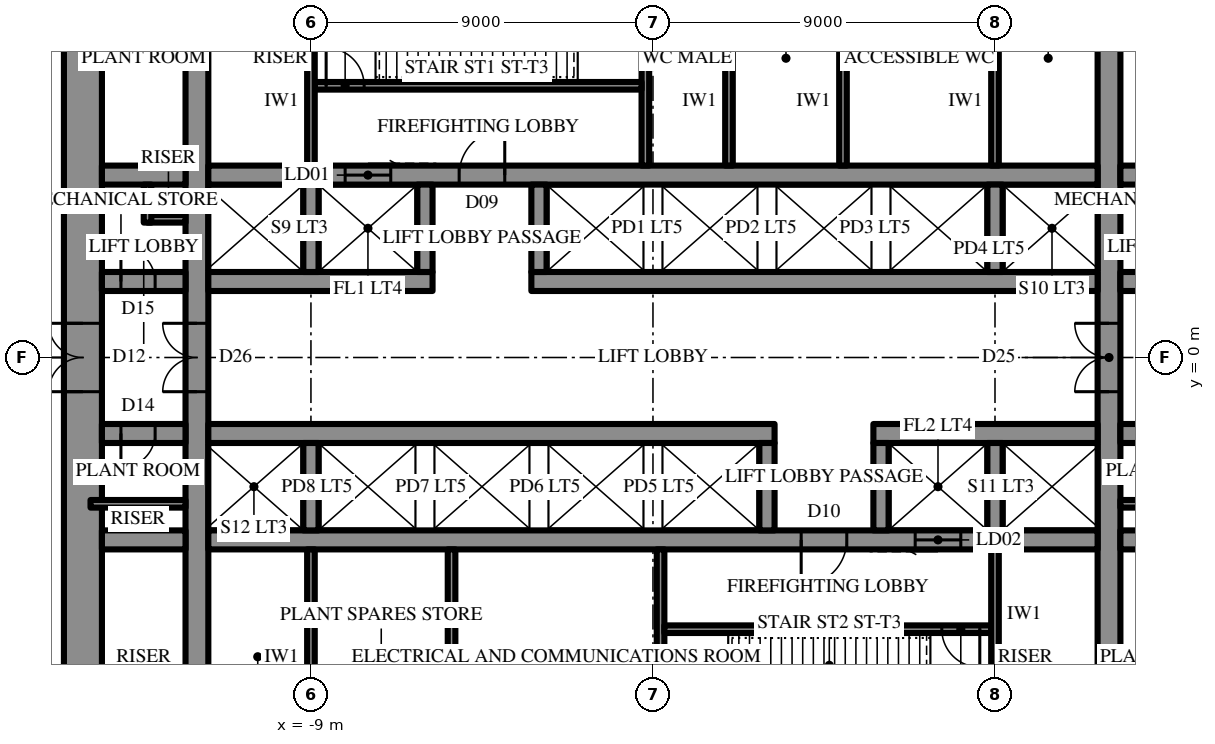
"""IFC4 building model, lengths in metres.
Left out: names, types, materials, properties, quantities, classifications, styles, units other than length and angle.
Written with IfcOpenShell. Run it as: python <this file> out.ifc"""

import sys

from ifc_helpers import new_model, si_unit, direction, frame, frame_2d, origin, place, context, subcontext, project, spatial, rectangle, extrude, element, fill, save


model = new_model("IFC4")
c1 = context("Model", 3, precision=1e-05, world=origin(), true_north=direction((0.0, 1.0)))
c2 = subcontext(c1, "Body", "Model", "MODEL_VIEW")
j1 = project(units=[si_unit("LENGTHUNIT", "METRE"), si_unit("PLANEANGLEUNIT", "RADIAN")], contexts=[c1])
p1 = place(None, origin())
s1 = spatial("IfcSite", under=j1, at=p1, CompositionType="ELEMENT")
p2 = place(p1, origin())
s2 = spatial("IfcBuilding", under=s1, at=p2, CompositionType="ELEMENT")
p3 = place(p2, frame((0.0, 0.0, 299.5)))
s3 = spatial("IfcBuildingStorey", under=s2, at=p3, CompositionType="ELEMENT", Elevation=299.5)
p4 = place(p3, frame((-15.0, 10.7, 0.0), z_axis=(0.0, 0.0, 1.0), x_axis=(0.0, -1.0, 0.0)))
e1 = element("IfcWall", 1, at=p4, inside=s3, PredefinedType="SHEAR", context=c2, shape_type="SweptSolid", body=[
    extrude(rectangle(XDim=21.4, YDim=1.0, at=frame_2d((10.7, 0.0))), origin(), (0.0, 0.0, 1.0), 7.0),
])
p5 = place(p4, frame((9.8, 0.0, 0.0)))
e2 = element("IfcOpeningElement", 2, at=p5, cuts=e1, PredefinedType="OPENING", context=c2, shape_type="SweptSolid", body=[
    extrude(rectangle(XDim=1.8, YDim=2.4, at=frame_2d((0.9, 1.2))), frame((0.0, 0.51, 0.0), z_axis=(0.0, -1.0, 0.0), x_axis=(1.0, 0.0, 0.0)), (0.0, 0.0, 1.0), 1.02),
])
p6 = place(p3, frame((12.0, -10.7, 0.0), z_axis=(0.0, 0.0, 1.0), x_axis=(0.0, 1.0, 0.0)))
e3 = element("IfcWall", 3, at=p6, inside=s3, PredefinedType="SHEAR", context=c2, shape_type="SweptSolid", body=[
    extrude(rectangle(XDim=21.4, YDim=0.6, at=frame_2d((10.7, 0.0))), origin(), (0.0, 0.0, 1.0), 7.0),
])
p7 = place(p6, frame((9.8, 0.0, 0.0)))
e4 = element("IfcOpeningElement", 4, at=p7, cuts=e3, PredefinedType="OPENING", context=c2, shape_type="SweptSolid", body=[
    extrude(rectangle(XDim=1.8, YDim=2.4, at=frame_2d((0.9, 1.2))), frame((0.0, 0.31, 0.0), z_axis=(0.0, -1.0, 0.0), x_axis=(1.0, 0.0, 0.0)), (0.0, 0.0, 1.0), 0.62),
])
p8 = place(p3, frame((-12.0, -10.7, 0.0), z_axis=(0.0, 0.0, 1.0), x_axis=(0.0, 1.0, 0.0)))
e5 = element("IfcWall", 5, at=p8, inside=s3, PredefinedType="SHEAR", context=c2, shape_type="SweptSolid", body=[
    extrude(rectangle(XDim=21.4, YDim=0.6, at=frame_2d((10.7, 0.0))), origin(), (0.0, 0.0, 1.0), 7.0),
])
p9 = place(p8, frame((9.8, 0.0, 0.0)))
e6 = element("IfcOpeningElement", 6, at=p9, cuts=e5, PredefinedType="OPENING", context=c2, shape_type="SweptSolid", body=[
    extrude(rectangle(XDim=1.8, YDim=2.4, at=frame_2d((0.9, 1.2))), frame((0.0, 0.31, 0.0), z_axis=(0.0, -1.0, 0.0), x_axis=(1.0, 0.0, 0.0)), (0.0, 0.0, 1.0), 0.62),
])
p10 = place(p3, frame((-14.5, 2.0, 0.0), z_axis=(0.0, 0.0, 1.0), x_axis=(1.0, 0.0, 0.0)))
e7 = element("IfcWall", 7, at=p10, inside=s3, PredefinedType="SHEAR", context=c2, shape_type="SweptSolid", body=[
    extrude(rectangle(XDim=2.2, YDim=0.5, at=frame_2d((1.1, 0.0))), origin(), (0.0, 0.0, 1.0), 7.0),
])
p11 = place(p10, frame((0.5, 0.0, 0.0)))
e8 = element("IfcOpeningElement", 8, at=p11, cuts=e7, PredefinedType="OPENING", context=c2, shape_type="SweptSolid", body=[
    extrude(rectangle(XDim=0.9, YDim=2.2, at=frame_2d((0.45, 1.1))), frame((0.0, 0.26, 0.0), z_axis=(0.0, -1.0, 0.0), x_axis=(1.0, 0.0, 0.0)), (0.0, 0.0, 1.0), 0.52),
])
p12 = place(p3, frame((-11.7, 2.0, 0.0), z_axis=(0.0, 0.0, 1.0), x_axis=(1.0, 0.0, 0.0)))
e9 = element("IfcWall", 9, at=p12, inside=s3, PredefinedType="SHEAR", context=c2, shape_type="SweptSolid", body=[
    extrude(rectangle(XDim=5.9, YDim=0.5, at=frame_2d((2.95, 0.0))), origin(), (0.0, 0.0, 1.0), 7.0),
])
p13 = place(p3, frame((-3.2, 2.0, 0.0), z_axis=(0.0, 0.0, 1.0), x_axis=(1.0, 0.0, 0.0)))
e10 = element("IfcWall", 10, at=p13, inside=s3, PredefinedType="SHEAR", context=c2, shape_type="SweptSolid", body=[
    extrude(rectangle(XDim=14.9, YDim=0.5, at=frame_2d((7.45, 0.0))), origin(), (0.0, 0.0, 1.0), 7.0),
])
p14 = place(p3, frame((12.3, 2.0, 0.0), z_axis=(0.0, 0.0, 1.0), x_axis=(1.0, 0.0, 0.0)))
e11 = element("IfcWall", 11, at=p14, inside=s3, PredefinedType="SHEAR", context=c2, shape_type="SweptSolid", body=[
    extrude(rectangle(XDim=2.2, YDim=0.5, at=frame_2d((1.1, 0.0))), origin(), (0.0, 0.0, 1.0), 7.0),
])
p15 = place(p14, frame((0.8, 0.0, 0.0)))
e12 = element("IfcOpeningElement", 12, at=p15, cuts=e11, PredefinedType="OPENING", context=c2, shape_type="SweptSolid", body=[
    extrude(rectangle(XDim=0.9, YDim=2.2, at=frame_2d((0.45, 1.1))), frame((0.0, 0.26, 0.0), z_axis=(0.0, -1.0, 0.0), x_axis=(1.0, 0.0, 0.0)), (0.0, 0.0, 1.0), 0.52),
])
p16 = place(p3, frame((-14.5, 4.8, 0.0), z_axis=(0.0, 0.0, 1.0), x_axis=(1.0, 0.0, 0.0)))
e13 = element("IfcWall", 13, at=p16, inside=s3, PredefinedType="SHEAR", context=c2, shape_type="SweptSolid", body=[
    extrude(rectangle(XDim=2.2, YDim=0.5, at=frame_2d((1.1, 0.0))), origin(), (0.0, 0.0, 1.0), 7.0),
])
p17 = place(p3, frame((-11.7, 4.8, 0.0), z_axis=(0.0, 0.0, 1.0), x_axis=(1.0, 0.0, 0.0)))
e14 = element("IfcWall", 14, at=p17, inside=s3, PredefinedType="SHEAR", context=c2, shape_type="SweptSolid", body=[
    extrude(rectangle(XDim=23.4, YDim=0.5, at=frame_2d((11.7, 0.0))), origin(), (0.0, 0.0, 1.0), 7.0),
])
p18 = place(p17, frame((6.6, 0.0, 0.0)))
e15 = element("IfcOpeningElement", 15, at=p18, cuts=e14, PredefinedType="OPENING", context=c2, shape_type="SweptSolid", body=[
    extrude(rectangle(XDim=1.2, YDim=2.2, at=frame_2d((0.6, 1.1))), frame((0.0, 0.26, 0.0), z_axis=(0.0, -1.0, 0.0), x_axis=(1.0, 0.0, 0.0)), (0.0, 0.0, 1.0), 0.52),
])
p19 = place(p17, frame((3.6, 0.0, 0.0)))
e16 = element("IfcOpeningElement", 16, at=p19, cuts=e14, PredefinedType="OPENING", context=c2, shape_type="SweptSolid", body=[
    extrude(rectangle(XDim=1.2, YDim=2.2, at=frame_2d((0.6, 1.1))), frame((0.0, 0.26, 0.0), z_axis=(0.0, -1.0, 0.0), x_axis=(1.0, 0.0, 0.0)), (0.0, 0.0, 1.0), 0.52),
])
p20 = place(p3, frame((12.3, 4.8, 0.0), z_axis=(0.0, 0.0, 1.0), x_axis=(1.0, 0.0, 0.0)))
e17 = element("IfcWall", 17, at=p20, inside=s3, PredefinedType="SHEAR", context=c2, shape_type="SweptSolid", body=[
    extrude(rectangle(XDim=2.2, YDim=0.5, at=frame_2d((1.1, 0.0))), origin(), (0.0, 0.0, 1.0), 7.0),
])
for number, where, z_axis, x_axis in (
    (18, (-9.0, 2.25, 0.0), (0.0, 0.0, 1.0), (0.0, 1.0, 0.0)),
    (19, (-6.0, 2.25, 0.0), (0.0, 0.0, 1.0), (0.0, 1.0, 0.0)),
    (20, (-3.0, 2.25, 0.0), (0.0, 0.0, 1.0), (0.0, 1.0, 0.0)),
    (21, (9.0, 2.25, 0.0), (0.0, 0.0, 1.0), (0.0, 1.0, 0.0)),
):
    element("IfcWall", number, at=place(p3, frame(where, z_axis=z_axis, x_axis=x_axis)), inside=s3, PredefinedType="SHEAR", context=c2, shape_type="SweptSolid", body=[
        extrude(rectangle(XDim=2.3, YDim=0.4, at=frame_2d((1.15, 0.0))), origin(), (0.0, 0.0, 1.0), 7.0),
    ])
p21 = place(p3, frame((-0.2, 5.05, 0.0), z_axis=(0.0, 0.0, 1.0), x_axis=(0.0, 1.0, 0.0)))
e22 = element("IfcWall", 22, at=p21, inside=s3, PredefinedType="SHEAR", context=c2, shape_type="SweptSolid", body=[
    extrude(rectangle(XDim=5.65, YDim=0.2, at=frame_2d((2.825, 0.0))), origin(), (0.0, 0.0, 1.0), 7.0),
])
p22 = place(p3, frame((-8.9, 7.15, 0.0), z_axis=(0.0, 0.0, 1.0), x_axis=(1.0, 0.0, 0.0)))
e23 = element("IfcWall", 23, at=p22, inside=s3, PredefinedType="SHEAR", context=c2, shape_type="SweptSolid", body=[
    extrude(rectangle(XDim=8.6, YDim=0.2, at=frame_2d((4.3, 0.0))), origin(), (0.0, 0.0, 1.0), 7.0),
])
p23 = place(p22, frame((0.3, 0.0, 0.0)))
e24 = element("IfcOpeningElement", 24, at=p23, cuts=e23, PredefinedType="OPENING", context=c2, shape_type="SweptSolid", body=[
    extrude(rectangle(XDim=1.0, YDim=2.2, at=frame_2d((0.5, 1.1))), frame((0.0, 0.11, 0.0), z_axis=(0.0, -1.0, 0.0), x_axis=(1.0, 0.0, 0.0)), (0.0, 0.0, 1.0), 0.22),
])
p24 = place(p3, frame((14.5, -2.0, 0.0), z_axis=(0.0, 0.0, 1.0), x_axis=(-1.0, 0.0, 0.0)))
e25 = element("IfcWall", 25, at=p24, inside=s3, PredefinedType="SHEAR", context=c2, shape_type="SweptSolid", body=[
    extrude(rectangle(XDim=2.2, YDim=0.5, at=frame_2d((1.1, 0.0))), origin(), (0.0, 0.0, 1.0), 7.0),
])
p25 = place(p24, frame((0.5, 0.0, 0.0)))
e26 = element("IfcOpeningElement", 26, at=p25, cuts=e25, PredefinedType="OPENING", context=c2, shape_type="SweptSolid", body=[
    extrude(rectangle(XDim=0.9, YDim=2.2, at=frame_2d((0.45, 1.1))), frame((0.0, 0.26, 0.0), z_axis=(0.0, -1.0, 0.0), x_axis=(1.0, 0.0, 0.0)), (0.0, 0.0, 1.0), 0.52),
])
p26 = place(p3, frame((11.7, -2.0, 0.0), z_axis=(0.0, 0.0, 1.0), x_axis=(-1.0, 0.0, 0.0)))
e27 = element("IfcWall", 27, at=p26, inside=s3, PredefinedType="SHEAR", context=c2, shape_type="SweptSolid", body=[
    extrude(rectangle(XDim=5.9, YDim=0.5, at=frame_2d((2.95, 0.0))), origin(), (0.0, 0.0, 1.0), 7.0),
])
p27 = place(p3, frame((3.2, -2.0, 0.0), z_axis=(0.0, 0.0, 1.0), x_axis=(-1.0, 0.0, 0.0)))
e28 = element("IfcWall", 28, at=p27, inside=s3, PredefinedType="SHEAR", context=c2, shape_type="SweptSolid", body=[
    extrude(rectangle(XDim=14.9, YDim=0.5, at=frame_2d((7.45, 0.0))), origin(), (0.0, 0.0, 1.0), 7.0),
])
p28 = place(p3, frame((-12.3, -2.0, 0.0), z_axis=(0.0, 0.0, 1.0), x_axis=(-1.0, 0.0, 0.0)))
e29 = element("IfcWall", 29, at=p28, inside=s3, PredefinedType="SHEAR", context=c2, shape_type="SweptSolid", body=[
    extrude(rectangle(XDim=2.2, YDim=0.5, at=frame_2d((1.1, 0.0))), origin(), (0.0, 0.0, 1.0), 7.0),
])
p29 = place(p28, frame((0.8, 0.0, 0.0)))
e30 = element("IfcOpeningElement", 30, at=p29, cuts=e29, PredefinedType="OPENING", context=c2, shape_type="SweptSolid", body=[
    extrude(rectangle(XDim=0.9, YDim=2.2, at=frame_2d((0.45, 1.1))), frame((0.0, 0.26, 0.0), z_axis=(0.0, -1.0, 0.0), x_axis=(1.0, 0.0, 0.0)), (0.0, 0.0, 1.0), 0.52),
])
p30 = place(p3, frame((14.5, -4.8, 0.0), z_axis=(0.0, 0.0, 1.0), x_axis=(-1.0, 0.0, 0.0)))
e31 = element("IfcWall", 31, at=p30, inside=s3, PredefinedType="SHEAR", context=c2, shape_type="SweptSolid", body=[
    extrude(rectangle(XDim=2.2, YDim=0.5, at=frame_2d((1.1, 0.0))), origin(), (0.0, 0.0, 1.0), 7.0),
])
p31 = place(p3, frame((11.7, -4.8, 0.0), z_axis=(0.0, 0.0, 1.0), x_axis=(-1.0, 0.0, 0.0)))
e32 = element("IfcWall", 32, at=p31, inside=s3, PredefinedType="SHEAR", context=c2, shape_type="SweptSolid", body=[
    extrude(rectangle(XDim=23.4, YDim=0.5, at=frame_2d((11.7, 0.0))), origin(), (0.0, 0.0, 1.0), 7.0),
])
p32 = place(p31, frame((6.6, 0.0, 0.0)))
e33 = element("IfcOpeningElement", 33, at=p32, cuts=e32, PredefinedType="OPENING", context=c2, shape_type="SweptSolid", body=[
    extrude(rectangle(XDim=1.2, YDim=2.2, at=frame_2d((0.6, 1.1))), frame((0.0, 0.26, 0.0), z_axis=(0.0, -1.0, 0.0), x_axis=(1.0, 0.0, 0.0)), (0.0, 0.0, 1.0), 0.52),
])
p33 = place(p31, frame((3.6, 0.0, 0.0)))
e34 = element("IfcOpeningElement", 34, at=p33, cuts=e32, PredefinedType="OPENING", context=c2, shape_type="SweptSolid", body=[
    extrude(rectangle(XDim=1.2, YDim=2.2, at=frame_2d((0.6, 1.1))), frame((0.0, 0.26, 0.0), z_axis=(0.0, -1.0, 0.0), x_axis=(1.0, 0.0, 0.0)), (0.0, 0.0, 1.0), 0.52),
])
p34 = place(p3, frame((-12.3, -4.8, 0.0), z_axis=(0.0, 0.0, 1.0), x_axis=(-1.0, 0.0, 0.0)))
e35 = element("IfcWall", 35, at=p34, inside=s3, PredefinedType="SHEAR", context=c2, shape_type="SweptSolid", body=[
    extrude(rectangle(XDim=2.2, YDim=0.5, at=frame_2d((1.1, 0.0))), origin(), (0.0, 0.0, 1.0), 7.0),
])
for number, where, z_axis, x_axis in (
    (36, (9.0, -2.25, 0.0), (0.0, 0.0, 1.0), (0.0, -1.0, 0.0)),
    (37, (6.0, -2.25, 0.0), (0.0, 0.0, 1.0), (0.0, -1.0, 0.0)),
    (38, (3.0, -2.25, 0.0), (0.0, 0.0, 1.0), (0.0, -1.0, 0.0)),
    (39, (-9.0, -2.25, 0.0), (0.0, 0.0, 1.0), (0.0, -1.0, 0.0)),
):
    element("IfcWall", number, at=place(p3, frame(where, z_axis=z_axis, x_axis=x_axis)), inside=s3, PredefinedType="SHEAR", context=c2, shape_type="SweptSolid", body=[
        extrude(rectangle(XDim=2.3, YDim=0.4, at=frame_2d((1.15, 0.0))), origin(), (0.0, 0.0, 1.0), 7.0),
    ])
p35 = place(p3, frame((0.2, -5.05, 0.0), z_axis=(0.0, 0.0, 1.0), x_axis=(0.0, -1.0, 0.0)))
e40 = element("IfcWall", 40, at=p35, inside=s3, PredefinedType="SHEAR", context=c2, shape_type="SweptSolid", body=[
    extrude(rectangle(XDim=5.65, YDim=0.2, at=frame_2d((2.825, 0.0))), origin(), (0.0, 0.0, 1.0), 7.0),
])
p36 = place(p3, frame((8.9, -7.15, 0.0), z_axis=(0.0, 0.0, 1.0), x_axis=(-1.0, 0.0, 0.0)))
e41 = element("IfcWall", 41, at=p36, inside=s3, PredefinedType="SHEAR", context=c2, shape_type="SweptSolid", body=[
    extrude(rectangle(XDim=8.6, YDim=0.2, at=frame_2d((4.3, 0.0))), origin(), (0.0, 0.0, 1.0), 7.0),
])
p37 = place(p36, frame((0.3, 0.0, 0.0)))
e42 = element("IfcOpeningElement", 42, at=p37, cuts=e41, PredefinedType="OPENING", context=c2, shape_type="SweptSolid", body=[
    extrude(rectangle(XDim=1.0, YDim=2.2, at=frame_2d((0.5, 1.1))), frame((0.0, 0.11, 0.0), z_axis=(0.0, -1.0, 0.0), x_axis=(1.0, 0.0, 0.0)), (0.0, 0.0, 1.0), 0.22),
])
for number, where, z_axis, x_axis in (
    (43, (-9.0, 5.05, 0.0), (0.0, 0.0, 1.0), (0.0, 1.0, 0.0)),
    (44, (9.0, 5.05, 0.0), (0.0, 0.0, 1.0), (0.0, 1.0, 0.0)),
    (45, (2.0, 5.05, 0.0), (0.0, 0.0, 1.0), (0.0, 1.0, 0.0)),
    (46, (5.0, 5.05, 0.0), (0.0, 0.0, 1.0), (0.0, 1.0, 0.0)),
    (47, (9.0, -5.05, 0.0), (0.0, 0.0, 1.0), (0.0, -1.0, 0.0)),
    (48, (-9.0, -5.05, 0.0), (0.0, 0.0, 1.0), (0.0, -1.0, 0.0)),
    (49, (-5.3, -5.05, 0.0), (0.0, 0.0, 1.0), (0.0, -1.0, 0.0)),
):
    element("IfcWall", number, at=place(p3, frame(where, z_axis=z_axis, x_axis=x_axis)), inside=s3, PredefinedType="PARTITIONING", context=c2, shape_type="SweptSolid", body=[
        extrude(rectangle(XDim=5.65, YDim=0.2, at=frame_2d((2.825, 0.0))), origin(), (0.0, 0.0, 1.0), 6.7),
    ])
for number, where, z_axis, x_axis in (
    (50, (-13.3, 3.65, 0.0), (0.0, 0.0, 1.0), (1.0, 0.0, 0.0)),
    (51, (-13.3, 3.55, 0.0), (0.0, 0.0, 1.0), (0.0, 1.0, 0.0)),
):
    element("IfcWall", number, at=place(p3, frame(where, z_axis=z_axis, x_axis=x_axis)), inside=s3, PredefinedType="PARTITIONING", context=c2, shape_type="SweptSolid", body=[
        extrude(rectangle(XDim=1.0, YDim=0.2, at=frame_2d((0.5, 0.0))), origin(), (0.0, 0.0, 1.0), 6.7),
    ])
for number, where, z_axis, x_axis in (
    (52, (14.8, -3.85, 0.0), (0.0, 0.0, 1.0), (-1.0, 0.0, 0.0)),
    (53, (-12.3, -3.85, 0.0), (0.0, 0.0, 1.0), (-1.0, 0.0, 0.0)),
):
    element("IfcWall", number, at=place(p3, frame(where, z_axis=z_axis, x_axis=x_axis)), inside=s3, PredefinedType="PARTITIONING", context=c2, shape_type="SweptSolid", body=[
        extrude(rectangle(XDim=2.5, YDim=0.2, at=frame_2d((1.25, 0.0))), origin(), (0.0, 0.0, 1.0), 6.7),
    ])
p38 = place(p5, frame((1.8, 0.0, 0.0), z_axis=(0.0, 0.0, 1.0), x_axis=(-1.0, 0.0, 0.0)))
e54 = element("IfcDoor", 54, at=p38, inside=s3, OperationType="DOUBLE_DOOR_SINGLE_SWING", PredefinedType="DOOR", context=c2, shape_type="SweptSolid", body=[
    extrude(rectangle(XDim=1.8, YDim=2.4, at=frame_2d((0.9, 1.2))), frame((0.0, 0.025, 0.0), z_axis=(0.0, -1.0, 0.0), x_axis=(1.0, 0.0, 0.0)), (0.0, 0.0, 1.0), 0.05),
])
fill(e2, e54)
p39 = place(p18, origin())
e55 = element("IfcDoor", 55, at=p39, inside=s3, OperationType="SINGLE_SWING_LEFT", PredefinedType="DOOR", context=c2, shape_type="SweptSolid", body=[
    extrude(rectangle(XDim=1.2, YDim=2.2, at=frame_2d((0.6, 1.1))), frame((0.0, 0.025, 0.0), z_axis=(0.0, -1.0, 0.0), x_axis=(1.0, 0.0, 0.0)), (0.0, 0.0, 1.0), 0.05),
])
fill(e15, e55)
p40 = place(p23, origin())
e56 = element("IfcDoor", 56, at=p40, inside=s3, OperationType="SINGLE_SWING_RIGHT", PredefinedType="DOOR", context=c2, shape_type="SweptSolid", body=[
    extrude(rectangle(XDim=1.0, YDim=2.2, at=frame_2d((0.5, 1.1))), frame((0.0, 0.025, 0.0), z_axis=(0.0, -1.0, 0.0), x_axis=(1.0, 0.0, 0.0)), (0.0, 0.0, 1.0), 0.05),
])
fill(e24, e56)
p41 = place(p32, origin())
e57 = element("IfcDoor", 57, at=p41, inside=s3, OperationType="SINGLE_SWING_LEFT", PredefinedType="DOOR", context=c2, shape_type="SweptSolid", body=[
    extrude(rectangle(XDim=1.2, YDim=2.2, at=frame_2d((0.6, 1.1))), frame((0.0, 0.025, 0.0), z_axis=(0.0, -1.0, 0.0), x_axis=(1.0, 0.0, 0.0)), (0.0, 0.0, 1.0), 0.05),
])
fill(e33, e57)
p42 = place(p37, origin())
e58 = element("IfcDoor", 58, at=p42, inside=s3, OperationType="SINGLE_SWING_RIGHT", PredefinedType="DOOR", context=c2, shape_type="SweptSolid", body=[
    extrude(rectangle(XDim=1.0, YDim=2.2, at=frame_2d((0.5, 1.1))), frame((0.0, 0.025, 0.0), z_axis=(0.0, -1.0, 0.0), x_axis=(1.0, 0.0, 0.0)), (0.0, 0.0, 1.0), 0.05),
])
fill(e42, e58)
p43 = place(p11, origin())
e59 = element("IfcDoor", 59, at=p43, inside=s3, OperationType="SINGLE_SWING_RIGHT", PredefinedType="DOOR", context=c2, shape_type="SweptSolid", body=[
    extrude(rectangle(XDim=0.9, YDim=2.2, at=frame_2d((0.45, 1.1))), frame((0.0, 0.025, 0.0), z_axis=(0.0, -1.0, 0.0), x_axis=(1.0, 0.0, 0.0)), (0.0, 0.0, 1.0), 0.05),
])
fill(e8, e59)
p44 = place(p29, origin())
e60 = element("IfcDoor", 60, at=p44, inside=s3, OperationType="SINGLE_SWING_LEFT", PredefinedType="DOOR", context=c2, shape_type="SweptSolid", body=[
    extrude(rectangle(XDim=0.9, YDim=2.2, at=frame_2d((0.45, 1.1))), frame((0.0, 0.025, 0.0), z_axis=(0.0, -1.0, 0.0), x_axis=(1.0, 0.0, 0.0)), (0.0, 0.0, 1.0), 0.05),
])
fill(e30, e60)
p45 = place(p7, origin())
e61 = element("IfcDoor", 61, at=p45, inside=s3, OperationType="DOUBLE_DOOR_SINGLE_SWING", PredefinedType="DOOR", context=c2, shape_type="SweptSolid", body=[
    extrude(rectangle(XDim=1.8, YDim=2.4, at=frame_2d((0.9, 1.2))), frame((0.0, 0.025, 0.0), z_axis=(0.0, -1.0, 0.0), x_axis=(1.0, 0.0, 0.0)), (0.0, 0.0, 1.0), 0.05),
])
fill(e4, e61)
p46 = place(p9, origin())
e62 = element("IfcDoor", 62, at=p46, inside=s3, OperationType="DOUBLE_DOOR_SINGLE_SWING", PredefinedType="DOOR", context=c2, shape_type="SweptSolid", body=[
    extrude(rectangle(XDim=1.8, YDim=2.4, at=frame_2d((0.9, 1.2))), frame((0.0, 0.025, 0.0), z_axis=(0.0, -1.0, 0.0), x_axis=(1.0, 0.0, 0.0)), (0.0, 0.0, 1.0), 0.05),
])
fill(e6, e62)
p47 = place(p19, origin())
e63 = element("IfcDoor", 63, at=p47, inside=s3, OperationType="SLIDING_TO_LEFT", PredefinedType="DOOR", context=c2, shape_type="SweptSolid", body=[
    extrude(rectangle(XDim=1.2, YDim=2.2, at=frame_2d((0.6, 1.1))), frame((0.0, 0.025, 0.0), z_axis=(0.0, -1.0, 0.0), x_axis=(1.0, 0.0, 0.0)), (0.0, 0.0, 1.0), 0.05),
])
fill(e16, e63)
p48 = place(p33, origin())
e64 = element("IfcDoor", 64, at=p48, inside=s3, OperationType="SLIDING_TO_LEFT", PredefinedType="DOOR", context=c2, shape_type="SweptSolid", body=[
    extrude(rectangle(XDim=1.2, YDim=2.2, at=frame_2d((0.6, 1.1))), frame((0.0, 0.025, 0.0), z_axis=(0.0, -1.0, 0.0), x_axis=(1.0, 0.0, 0.0)), (0.0, 0.0, 1.0), 0.05),
])
fill(e34, e64)
save(model, sys.argv[1])
